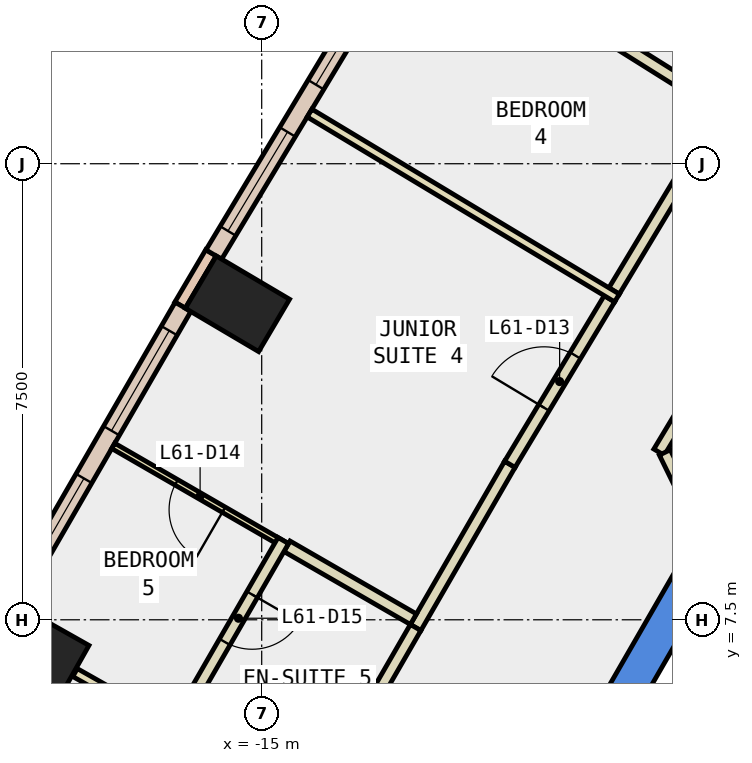
"""IFC4 building model, lengths in metres.
Left out: names, types, materials, properties, quantities, classifications, styles, units other than length and angle.
Written with IfcOpenShell. Run it as: python <this file> out.ifc"""

import sys

from ifc_helpers import new_model, si_unit, direction, frame, frame_2d, origin, origin_2d, place, context, subcontext, project, spatial, polyline, rectangle, outline, extrude, element, fill, save


model = new_model("IFC4")
c1 = context("Model", 3, precision=1e-05, world=origin(), true_north=direction((0.0, 1.0)))
c2 = subcontext(c1, "Body", "Model", "MODEL_VIEW")
j1 = project(units=[si_unit("LENGTHUNIT", "METRE"), si_unit("PLANEANGLEUNIT", "RADIAN")], contexts=[c1])
p1 = place(None, origin())
s1 = spatial("IfcSite", under=j1, at=p1, CompositionType="ELEMENT")
p2 = place(p1, origin())
s2 = spatial("IfcBuilding", under=s1, at=p2, CompositionType="ELEMENT")
p3 = place(p2, frame((0.0, 0.0, 266.6)))
s3 = spatial("IfcBuildingStorey", under=s2, at=p3, CompositionType="ELEMENT", Elevation=266.6)
for number, where, z_axis, x_axis in (
    (1, (-15.399, 12.697, -0.34), (0.0, 0.0, 1.0), (0.509, 0.861, 0.0)),
    (2, (-18.696, 6.987, -0.34), (0.0, 0.0, 1.0), (0.491, 0.871, 0.0)),
):
    element("IfcColumn", number, at=place(p3, frame(where, z_axis=z_axis, x_axis=x_axis)), inside=s3, PredefinedType="COLUMN", context=c2, shape_type="SweptSolid", body=[
        extrude(rectangle(XDim=1.0, YDim=1.4, at=origin_2d()), origin(), (0.0, 0.0, 1.0), 3.6),
    ])
p4 = place(p3, frame((0.0, 0.0, -0.34)))
e3 = element("IfcWall", 3, at=p4, inside=s3, PredefinedType="SHEAR", context=c2, shape_type="SweptSolid", body=[
    extrude(outline(polyline([(-10.535, 4.253), (-10.015, 3.953), (-5.427, 11.9), (-5.774, 12.5), (-10.535, 4.253)])), origin(), (0.0, 0.0, 1.0), 3.6),
])
p5 = place(p3, frame((-15.834, 13.535, 0.0), z_axis=(0.0, 0.0, 1.0), x_axis=(-0.508268432768, -0.861198699634, 0.0)))
e4 = element("IfcWall", 4, at=p5, inside=s3, PredefinedType="STANDARD", context=c2, shape_type="SweptSolid", body=[
    extrude(rectangle(XDim=1.0, YDim=0.2, at=frame_2d((0.5, 0.0))), origin(), (0.0, 0.0, 1.0), 3.26),
])
p6 = place(p3, frame((-12.895, 18.316, 0.0), z_axis=(0.0, 0.0, 1.0), x_axis=(-0.515435742129, -0.856928232547, 0.0)))
e5 = element("IfcWall", 5, at=p6, inside=s3, PredefinedType="STANDARD", context=c2, shape_type="SweptSolid", body=[
    extrude(rectangle(XDim=5.613, YDim=0.3, at=frame_2d((2.806, 0.0))), origin(), (0.0, 0.0, 1.0), 3.26),
])
p7 = place(p6, frame((0.453, 0.0, 0.9)))
e6 = element("IfcOpeningElement", 6, at=p7, cuts=e5, PredefinedType="OPENING", context=c2, shape_type="SweptSolid", body=[
    extrude(rectangle(XDim=1.9, YDim=2.0, at=frame_2d((0.95, 1.0))), frame((0.0, 0.16, 0.0), z_axis=(0.0, -1.0, 0.0), x_axis=(1.0, 0.0, 0.0)), (0.0, 0.0, 1.0), 0.32),
])
p8 = place(p6, frame((3.26, 0.0, 0.9)))
e7 = element("IfcOpeningElement", 7, at=p8, cuts=e5, PredefinedType="OPENING", context=c2, shape_type="SweptSolid", body=[
    extrude(rectangle(XDim=1.9, YDim=2.0, at=frame_2d((0.95, 1.0))), frame((0.0, 0.16, 0.0), z_axis=(0.0, -1.0, 0.0), x_axis=(1.0, 0.0, 0.0)), (0.0, 0.0, 1.0), 0.32),
])
p9 = place(p3, frame((-16.294, 12.647, 0.0), z_axis=(0.0, 0.0, 1.0), x_axis=(-0.500041292042, -0.866001562501, 0.0)))
e8 = element("IfcWall", 8, at=p9, inside=s3, PredefinedType="STANDARD", context=c2, shape_type="SweptSolid", body=[
    extrude(rectangle(XDim=5.612, YDim=0.3, at=frame_2d((2.806, 0.0))), origin(), (0.0, 0.0, 1.0), 3.26),
])
p10 = place(p9, frame((0.453, 0.0, 0.9)))
e9 = element("IfcOpeningElement", 9, at=p10, cuts=e8, PredefinedType="OPENING", context=c2, shape_type="SweptSolid", body=[
    extrude(rectangle(XDim=1.9, YDim=2.0, at=frame_2d((0.95, 1.0))), frame((0.0, 0.16, 0.0), z_axis=(0.0, -1.0, 0.0), x_axis=(1.0, 0.0, 0.0)), (0.0, 0.0, 1.0), 0.32),
])
p11 = place(p9, frame((3.259, 0.0, 0.9)))
e10 = element("IfcOpeningElement", 10, at=p11, cuts=e8, PredefinedType="OPENING", context=c2, shape_type="SweptSolid", body=[
    extrude(rectangle(XDim=1.9, YDim=2.0, at=frame_2d((0.95, 1.0))), frame((0.0, 0.16, 0.0), z_axis=(0.0, -1.0, 0.0), x_axis=(1.0, 0.0, 0.0)), (0.0, 0.0, 1.0), 0.32),
])
p12 = place(p3, frame((-6.054, 14.264, 0.0), z_axis=(0.0, 0.0, 1.0), x_axis=(-0.515508653897, -0.856884372455, 0.0)))
e11 = element("IfcWall", 11, at=p12, inside=s3, PredefinedType="PARTITIONING", context=c2, shape_type="SweptSolid", body=[
    extrude(rectangle(XDim=4.677, YDim=0.2, at=frame_2d((2.339, 0.0))), origin(), (0.0, 0.0, 1.0), 3.26),
])
p13 = place(p12, frame((1.839, 0.0, 0.0)))
e12 = element("IfcOpeningElement", 12, at=p13, cuts=e11, PredefinedType="OPENING", context=c2, shape_type="SweptSolid", body=[
    extrude(rectangle(XDim=1.0, YDim=2.1, at=frame_2d((0.5, 1.05))), frame((0.0, 0.11, 0.0), z_axis=(0.0, -1.0, 0.0), x_axis=(1.0, 0.0, 0.0)), (0.0, 0.0, 1.0), 0.22),
])
p14 = place(p3, frame((-8.37, 10.252, 0.0), z_axis=(0.0, 0.0, 1.0), x_axis=(0.440562172885, -0.897722101668, 0.0)))
e13 = element("IfcWall", 13, at=p14, inside=s3, PredefinedType="PARTITIONING", context=c2, shape_type="SweptSolid", body=[
    extrude(rectangle(XDim=1.353, YDim=0.2, at=frame_2d((0.677, 0.0))), origin(), (0.0, 0.0, 1.0), 3.26),
])
p15 = place(p3, frame((-9.204, 12.908, 0.0), z_axis=(0.0, 0.0, 1.0), x_axis=(0.51556943596, 0.856847802532, 0.0)))
e14 = element("IfcWall", 14, at=p15, inside=s3, PredefinedType="PARTITIONING", context=c2, shape_type="SweptSolid", body=[
    extrude(rectangle(XDim=3.176, YDim=0.2, at=frame_2d((1.588, 0.0))), origin(), (0.0, 0.0, 1.0), 3.26),
])
p16 = place(p3, frame((-12.469, 7.373, 0.0), z_axis=(0.0, 0.0, 1.0), x_axis=(0.500129289791, 0.86595074542, 0.0)))
e15 = element("IfcWall", 15, at=p16, inside=s3, PredefinedType="PARTITIONING", context=c2, shape_type="SweptSolid", body=[
    extrude(rectangle(XDim=3.099, YDim=0.2, at=frame_2d((1.55, 0.0))), origin(), (0.0, 0.0, 1.0), 3.26),
])
p17 = place(p3, frame((-10.919, 10.057, 0.0), z_axis=(0.0, 0.0, 1.0), x_axis=(0.515568955032, 0.856848091908, 0.0)))
e16 = element("IfcWall", 16, at=p17, inside=s3, PredefinedType="PARTITIONING", context=c2, shape_type="SweptSolid", body=[
    extrude(rectangle(XDim=3.177, YDim=0.2, at=frame_2d((1.588, 0.0))), origin(), (0.0, 0.0, 1.0), 3.26),
])
p18 = place(p17, frame((1.088, 0.0, 0.0)))
e17 = element("IfcOpeningElement", 17, at=p18, cuts=e16, PredefinedType="OPENING", context=c2, shape_type="SweptSolid", body=[
    extrude(rectangle(XDim=1.0, YDim=2.1, at=frame_2d((0.5, 1.05))), frame((0.0, 0.11, 0.0), z_axis=(0.0, -1.0, 0.0), x_axis=(1.0, 0.0, 0.0)), (0.0, 0.0, 1.0), 0.22),
])
p19 = place(p3, frame((-13.869, 4.948, 0.0), z_axis=(0.0, 0.0, 1.0), x_axis=(0.49994636267, 0.866056369097, 0.0)))
e18 = element("IfcWall", 18, at=p19, inside=s3, PredefinedType="PARTITIONING", context=c2, shape_type="SweptSolid", body=[
    extrude(rectangle(XDim=2.8, YDim=0.2, at=frame_2d((1.4, 0.0))), origin(), (0.0, 0.0, 1.0), 3.26),
])
p20 = place(p3, frame((-9.517, 17.226, 0.0), z_axis=(0.0, 0.0, 1.0), x_axis=(0.847229363594, -0.53122726348, 0.0)))
e19 = element("IfcWall", 19, at=p20, inside=s3, PredefinedType="PARTITIONING", context=c2, shape_type="SweptSolid", body=[
    extrude(rectangle(XDim=2.5, YDim=0.2, at=frame_2d((1.25, 0.0))), origin(), (0.0, 0.0, 1.0), 3.26),
])
p21 = place(p3, frame((-9.157, 12.792, 0.0), z_axis=(0.0, 0.0, 1.0), x_axis=(-0.856933793276, 0.515426497129, 0.0)))
e20 = element("IfcWall", 20, at=p21, inside=s3, PredefinedType="PARTITIONING", context=c2, shape_type="SweptSolid", body=[
    extrude(rectangle(XDim=5.9, YDim=0.15, at=frame_2d((2.95, 0.0))), origin(), (0.0, 0.0, 1.0), 3.26),
])
p22 = place(p3, frame((-14.584, 8.71, 0.0), z_axis=(0.0, 0.0, 1.0), x_axis=(-0.866008176907, 0.50002983664, 0.0)))
e21 = element("IfcWall", 21, at=p22, inside=s3, PredefinedType="PARTITIONING", context=c2, shape_type="SweptSolid", body=[
    extrude(rectangle(XDim=3.3, YDim=0.1, at=frame_2d((1.65, 0.0))), origin(), (0.0, 0.0, 1.0), 3.26),
])
p23 = place(p22, frame((1.2, 0.0, 0.0)))
e22 = element("IfcOpeningElement", 22, at=p23, cuts=e21, PredefinedType="OPENING", context=c2, shape_type="SweptSolid", body=[
    extrude(rectangle(XDim=0.9, YDim=2.1, at=frame_2d((0.45, 1.05))), frame((0.0, 0.06, 0.0), z_axis=(0.0, -1.0, 0.0), x_axis=(1.0, 0.0, 0.0)), (0.0, 0.0, 1.0), 0.12),
])
p24 = place(p3, frame((-12.505, 7.51, 0.0), z_axis=(0.0, 0.0, 1.0), x_axis=(-0.866277021052, 0.499563932643, 0.0)))
e23 = element("IfcWall", 23, at=p24, inside=s3, PredefinedType="PARTITIONING", context=c2, shape_type="SweptSolid", body=[
    extrude(rectangle(XDim=2.4, YDim=0.2, at=frame_2d((1.2, 0.0))), origin(), (0.0, 0.0, 1.0), 3.26),
])
p25 = place(p3, frame((-14.645, 8.803, 0.0), z_axis=(0.0, 0.0, 1.0), x_axis=(-0.500001826776, -0.866024349092, 0.0)))
e24 = element("IfcWall", 24, at=p25, inside=s3, PredefinedType="PARTITIONING", context=c2, shape_type="SweptSolid", body=[
    extrude(rectangle(XDim=2.95, YDim=0.2, at=frame_2d((1.475, 0.0))), origin(), (0.0, 0.0, 1.0), 3.26),
])
p26 = place(p25, frame((1.025, 0.0, 0.0)))
e25 = element("IfcOpeningElement", 25, at=p26, cuts=e24, PredefinedType="OPENING", context=c2, shape_type="SweptSolid", body=[
    extrude(rectangle(XDim=0.9, YDim=2.1, at=frame_2d((0.45, 1.05))), frame((0.0, 0.11, 0.0), z_axis=(0.0, -1.0, 0.0), x_axis=(1.0, 0.0, 0.0)), (0.0, 0.0, 1.0), 0.22),
])
p27 = place(p3, frame((-14.083, 4.377, 0.0), z_axis=(0.0, 0.0, 1.0), x_axis=(-0.870415885751, 0.492317159799, 0.0)))
e26 = element("IfcWall", 26, at=p27, inside=s3, PredefinedType="PARTITIONING", context=c2, shape_type="SweptSolid", body=[
    extrude(rectangle(XDim=4.581, YDim=0.15, at=frame_2d((2.29, 0.0))), origin(), (0.0, 0.0, 1.0), 3.26),
])
p28 = place(p3, frame((-5.03, 9.388, 0.0), z_axis=(0.0, 0.0, 1.0), x_axis=(-0.499978703459, -0.866037698999, 0.0)))
e27 = element("IfcWall", 27, at=p28, inside=s3, PredefinedType="STANDARD", context=c2, shape_type="SweptSolid", body=[
    extrude(rectangle(XDim=6.9, YDim=0.2, at=frame_2d((3.45, 0.0))), origin(), (0.0, 0.0, 1.0), 3.26),
])
p29 = place(p7, origin())
e28 = element("IfcWindow", 28, at=p29, inside=s3, PartitioningType="SINGLE_PANEL", PredefinedType="WINDOW", context=c2, shape_type="SweptSolid", body=[
    extrude(rectangle(XDim=1.9, YDim=2.0, at=frame_2d((0.95, 1.0))), frame((0.0, 0.03, 0.0), z_axis=(0.0, -1.0, 0.0), x_axis=(1.0, 0.0, 0.0)), (0.0, 0.0, 1.0), 0.06),
])
fill(e6, e28)
p30 = place(p8, origin())
e29 = element("IfcWindow", 29, at=p30, inside=s3, PartitioningType="SINGLE_PANEL", PredefinedType="WINDOW", context=c2, shape_type="SweptSolid", body=[
    extrude(rectangle(XDim=1.9, YDim=2.0, at=frame_2d((0.95, 1.0))), frame((0.0, 0.03, 0.0), z_axis=(0.0, -1.0, 0.0), x_axis=(1.0, 0.0, 0.0)), (0.0, 0.0, 1.0), 0.06),
])
fill(e7, e29)
p31 = place(p10, origin())
e30 = element("IfcWindow", 30, at=p31, inside=s3, PartitioningType="SINGLE_PANEL", PredefinedType="WINDOW", context=c2, shape_type="SweptSolid", body=[
    extrude(rectangle(XDim=1.9, YDim=2.0, at=frame_2d((0.95, 1.0))), frame((0.0, 0.03, 0.0), z_axis=(0.0, -1.0, 0.0), x_axis=(1.0, 0.0, 0.0)), (0.0, 0.0, 1.0), 0.06),
])
fill(e9, e30)
p32 = place(p11, origin())
e31 = element("IfcWindow", 31, at=p32, inside=s3, PartitioningType="SINGLE_PANEL", PredefinedType="WINDOW", context=c2, shape_type="SweptSolid", body=[
    extrude(rectangle(XDim=1.9, YDim=2.0, at=frame_2d((0.95, 1.0))), frame((0.0, 0.03, 0.0), z_axis=(0.0, -1.0, 0.0), x_axis=(1.0, 0.0, 0.0)), (0.0, 0.0, 1.0), 0.06),
])
fill(e10, e31)
p33 = place(p18, origin())
e32 = element("IfcDoor", 32, at=p33, inside=s3, OperationType="SINGLE_SWING_LEFT", PredefinedType="DOOR", context=c2, shape_type="SweptSolid", body=[
    extrude(rectangle(XDim=1.0, YDim=2.1, at=frame_2d((0.5, 1.05))), frame((0.0, 0.025, 0.0), z_axis=(0.0, -1.0, 0.0), x_axis=(1.0, 0.0, 0.0)), (0.0, 0.0, 1.0), 0.05),
])
fill(e17, e32)
p34 = place(p23, origin())
e33 = element("IfcDoor", 33, at=p34, inside=s3, OperationType="SINGLE_SWING_LEFT", PredefinedType="DOOR", context=c2, shape_type="SweptSolid", body=[
    extrude(rectangle(XDim=0.9, YDim=2.1, at=frame_2d((0.45, 1.05))), frame((0.0, 0.025, 0.0), z_axis=(0.0, -1.0, 0.0), x_axis=(1.0, 0.0, 0.0)), (0.0, 0.0, 1.0), 0.05),
])
fill(e22, e33)
p35 = place(p26, origin())
e34 = element("IfcDoor", 34, at=p35, inside=s3, OperationType="SINGLE_SWING_LEFT", PredefinedType="DOOR", context=c2, shape_type="SweptSolid", body=[
    extrude(rectangle(XDim=0.9, YDim=2.1, at=frame_2d((0.45, 1.05))), frame((0.0, 0.025, 0.0), z_axis=(0.0, -1.0, 0.0), x_axis=(1.0, 0.0, 0.0)), (0.0, 0.0, 1.0), 0.05),
])
fill(e25, e34)
save(model, sys.argv[1])
